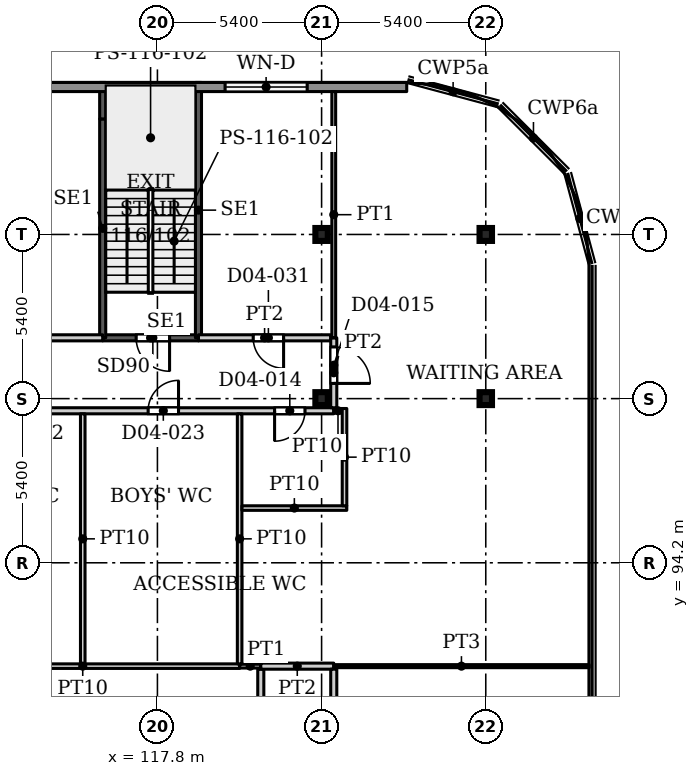
"""IFC4 building model, lengths in metres.
Left out: names, types, materials, properties, quantities, classifications, styles, units other than length and angle.
Written with IfcOpenShell. Run it as: python <this file> out.ifc"""

import sys

from ifc_helpers import new_model, si_unit, direction, frame, frame_2d, origin, origin_2d, place, context, subcontext, project, spatial, rectangle, i_section, extrude, source, transform, mapped, element, fill, save


model = new_model("IFC4")
c1 = context("Model", 3, precision=1e-05, world=origin(), true_north=direction((0.0, 1.0)))
c2 = subcontext(c1, "Body", "Model", "MODEL_VIEW")
j1 = project(units=[si_unit("LENGTHUNIT", "METRE"), si_unit("PLANEANGLEUNIT", "RADIAN")], contexts=[c1])
p1 = place(None, origin())
s1 = spatial("IfcSite", under=j1, at=p1, CompositionType="ELEMENT")
p2 = place(p1, origin())
s2 = spatial("IfcBuilding", under=s1, at=p2, CompositionType="ELEMENT")
p3 = place(p2, frame((0.0, 0.0, 21.5)))
s3 = spatial("IfcBuildingStorey", under=s2, at=p3, CompositionType="ELEMENT", Elevation=21.5)
for number, where, z_axis, x_axis in (
    (1, (123.2, 99.6, 0.0), (0.0, 0.0, 1.0), (1.0, 0.0, 0.0)),
    (2, (128.6, 99.6, 0.0), (0.0, 0.0, 1.0), (1.0, 0.0, 0.0)),
    (3, (123.2, 105.0, 0.0), (0.0, 0.0, 1.0), (1.0, 0.0, 0.0)),
    (4, (128.6, 105.0, 0.0), (0.0, 0.0, 1.0), (1.0, 0.0, 0.0)),
):
    element("IfcColumn", number, at=place(p3, frame(where, z_axis=z_axis, x_axis=x_axis)), inside=s3, PredefinedType="COLUMN", context=c2, shape_type="SweptSolid", body=[
        extrude(i_section(OverallWidth=0.409, OverallDepth=0.425, WebThickness=0.033, FlangeThickness=0.052, FilletRadius=0.013, at=origin_2d()), origin(), (0.0, 0.0, 1.0), 4.5),
    ])
p4 = place(p3, frame((78.48, 109.85, 0.0), z_axis=(0.0, 0.0, 1.0), x_axis=(1.0, 0.0, 0.0)))
e5 = element("IfcWall", 5, at=p4, inside=s3, PredefinedType="SOLIDWALL", context=c2, shape_type="SweptSolid", body=[
    extrude(rectangle(XDim=47.52, YDim=0.3, at=frame_2d((23.76, 0.0))), origin(), (0.0, 0.0, 1.0), 4.25),
])
p5 = place(p4, frame((1.045, 0.0, 0.9)))
e6 = element("IfcOpeningElement", 6, at=p5, cuts=e5, PredefinedType="OPENING", context=c2, shape_type="SweptSolid", body=[
    extrude(rectangle(XDim=2.7, YDim=2.1, at=frame_2d((1.35, 1.05))), frame((0.0, 0.16, 0.0), z_axis=(0.0, -1.0, 0.0), x_axis=(1.0, 0.0, 0.0)), (0.0, 0.0, 1.0), 0.32),
])
p6 = place(p4, frame((6.28, 0.0, 0.9)))
e7 = element("IfcOpeningElement", 7, at=p6, cuts=e5, PredefinedType="OPENING", context=c2, shape_type="SweptSolid", body=[
    extrude(rectangle(XDim=2.7, YDim=2.1, at=frame_2d((1.35, 1.05))), frame((0.0, 0.16, 0.0), z_axis=(0.0, -1.0, 0.0), x_axis=(1.0, 0.0, 0.0)), (0.0, 0.0, 1.0), 0.32),
])
p7 = place(p4, frame((15.765, 0.0, 0.9)))
e8 = element("IfcOpeningElement", 8, at=p7, cuts=e5, PredefinedType="OPENING", context=c2, shape_type="SweptSolid", body=[
    extrude(rectangle(XDim=2.7, YDim=2.1, at=frame_2d((1.35, 1.05))), frame((0.0, 0.16, 0.0), z_axis=(0.0, -1.0, 0.0), x_axis=(1.0, 0.0, 0.0)), (0.0, 0.0, 1.0), 0.32),
])
p8 = place(p4, frame((22.47, 0.0, 0.9)))
e9 = element("IfcOpeningElement", 9, at=p8, cuts=e5, PredefinedType="OPENING", context=c2, shape_type="SweptSolid", body=[
    extrude(rectangle(XDim=2.7, YDim=2.1, at=frame_2d((1.35, 1.05))), frame((0.0, 0.16, 0.0), z_axis=(0.0, -1.0, 0.0), x_axis=(1.0, 0.0, 0.0)), (0.0, 0.0, 1.0), 0.32),
])
p9 = place(p4, frame((30.99, 0.0, 0.9)))
e10 = element("IfcOpeningElement", 10, at=p9, cuts=e5, PredefinedType="OPENING", context=c2, shape_type="SweptSolid", body=[
    extrude(rectangle(XDim=2.7, YDim=2.1, at=frame_2d((1.35, 1.05))), frame((0.0, 0.16, 0.0), z_axis=(0.0, -1.0, 0.0), x_axis=(1.0, 0.0, 0.0)), (0.0, 0.0, 1.0), 0.32),
])
p10 = place(p4, frame((41.545, 0.0, 0.9)))
e11 = element("IfcOpeningElement", 11, at=p10, cuts=e5, PredefinedType="OPENING", context=c2, shape_type="SweptSolid", body=[
    extrude(rectangle(XDim=2.7, YDim=2.1, at=frame_2d((1.35, 1.05))), frame((0.0, 0.16, 0.0), z_axis=(0.0, -1.0, 0.0), x_axis=(1.0, 0.0, 0.0)), (0.0, 0.0, 1.0), 0.32),
])
p11 = place(p3, frame((116.0, 101.6, 0.0), z_axis=(0.0, 0.0, 1.0), x_axis=(1.0, 0.0, 0.0)))
e12 = element("IfcWall", 12, at=p11, inside=s3, PredefinedType="SHEAR", context=c2, shape_type="SweptSolid", body=[
    extrude(rectangle(XDim=3.15, YDim=0.2, at=frame_2d((1.575, 0.0))), origin(), (0.0, 0.0, 1.0), 4.5),
])
p12 = place(p11, frame((1.1, 0.0, 0.0)))
e13 = element("IfcOpeningElement", 13, at=p12, cuts=e12, PredefinedType="OPENING", context=c2, shape_type="SweptSolid", body=[
    extrude(rectangle(XDim=1.1, YDim=2.2, at=frame_2d((0.55, 1.1))), frame((0.0, 0.11, 0.0), z_axis=(0.0, -1.0, 0.0), x_axis=(1.0, 0.0, 0.0)), (0.0, 0.0, 1.0), 0.22),
])
p13 = place(p3, frame((116.0, 101.6, 0.0), z_axis=(0.0, 0.0, 1.0), x_axis=(0.0, 1.0, 0.0)))
e14 = element("IfcWall", 14, at=p13, inside=s3, PredefinedType="SHEAR", context=c2, shape_type="SweptSolid", body=[
    extrude(rectangle(XDim=7.2, YDim=0.2, at=frame_2d((3.6, 0.0))), origin(), (0.0, 0.0, 1.0), 4.5),
])
p14 = place(p3, frame((116.0, 108.8, 0.0), z_axis=(0.0, 0.0, 1.0), x_axis=(0.0, 1.0, 0.0)))
e15 = element("IfcWall", 15, at=p14, inside=s3, PredefinedType="SHEAR", context=c2, shape_type="SweptSolid", body=[
    extrude(rectangle(XDim=1.2, YDim=0.2, at=frame_2d((0.6, 0.0))), origin(), (0.0, 0.0, 1.0), 4.5),
])
p15 = place(p3, frame((119.15, 101.6, 0.0), z_axis=(0.0, 0.0, 1.0), x_axis=(0.0, 1.0, 0.0)))
e16 = element("IfcWall", 16, at=p15, inside=s3, PredefinedType="SHEAR", context=c2, shape_type="SweptSolid", body=[
    extrude(rectangle(XDim=8.4, YDim=0.2, at=frame_2d((4.2, 0.0))), origin(), (0.0, 0.0, 1.0), 4.5),
])
p16 = place(p3, frame((56.1, 99.2, 0.0), z_axis=(0.0, 0.0, 1.0), x_axis=(1.0, 0.0, 0.0)))
e17 = element("IfcWall", 17, at=p16, inside=s3, PredefinedType="PARTITIONING", context=c2, shape_type="SweptSolid", body=[
    extrude(rectangle(XDim=67.5, YDim=0.2, at=frame_2d((33.75, 0.0))), origin(), (0.0, 0.0, 1.0), 4.18),
])
p17 = place(p16, frame((4.05, 0.0, 0.0)))
e18 = element("IfcOpeningElement", 18, at=p17, cuts=e17, PredefinedType="OPENING", context=c2, shape_type="SweptSolid", body=[
    extrude(rectangle(XDim=1.0, YDim=2.1, at=frame_2d((0.5, 1.05))), frame((0.0, 0.11, 0.0), z_axis=(0.0, -1.0, 0.0), x_axis=(1.0, 0.0, 0.0)), (0.0, 0.0, 1.0), 0.22),
])
p18 = place(p16, frame((65.554, 0.0, 0.0)))
e19 = element("IfcOpeningElement", 19, at=p18, cuts=e17, PredefinedType="OPENING", context=c2, shape_type="SweptSolid", body=[
    extrude(rectangle(XDim=1.0, YDim=2.1, at=frame_2d((0.5, 1.05))), frame((0.0, 0.11, 0.0), z_axis=(0.0, -1.0, 0.0), x_axis=(1.0, 0.0, 0.0)), (0.0, 0.0, 1.0), 0.22),
])
p19 = place(p16, frame((11.589, 0.0, 0.0)))
e20 = element("IfcOpeningElement", 20, at=p19, cuts=e17, PredefinedType="OPENING", context=c2, shape_type="SweptSolid", body=[
    extrude(rectangle(XDim=1.0, YDim=2.1, at=frame_2d((0.5, 1.05))), frame((0.0, 0.11, 0.0), z_axis=(0.0, -1.0, 0.0), x_axis=(1.0, 0.0, 0.0)), (0.0, 0.0, 1.0), 0.22),
])
p20 = place(p16, frame((20.329, 0.0, 0.0)))
e21 = element("IfcOpeningElement", 21, at=p20, cuts=e17, PredefinedType="OPENING", context=c2, shape_type="SweptSolid", body=[
    extrude(rectangle(XDim=1.0, YDim=2.1, at=frame_2d((0.5, 1.05))), frame((0.0, 0.11, 0.0), z_axis=(0.0, -1.0, 0.0), x_axis=(1.0, 0.0, 0.0)), (0.0, 0.0, 1.0), 0.22),
])
p21 = place(p16, frame((27.319, 0.0, 0.0)))
e22 = element("IfcOpeningElement", 22, at=p21, cuts=e17, PredefinedType="OPENING", context=c2, shape_type="SweptSolid", body=[
    extrude(rectangle(XDim=1.0, YDim=2.1, at=frame_2d((0.5, 1.05))), frame((0.0, 0.11, 0.0), z_axis=(0.0, -1.0, 0.0), x_axis=(1.0, 0.0, 0.0)), (0.0, 0.0, 1.0), 0.22),
])
p22 = place(p16, frame((33.262, 0.0, 0.0)))
e23 = element("IfcOpeningElement", 23, at=p22, cuts=e17, PredefinedType="OPENING", context=c2, shape_type="SweptSolid", body=[
    extrude(rectangle(XDim=1.0, YDim=2.1, at=frame_2d((0.5, 1.05))), frame((0.0, 0.11, 0.0), z_axis=(0.0, -1.0, 0.0), x_axis=(1.0, 0.0, 0.0)), (0.0, 0.0, 1.0), 0.22),
])
p23 = place(p16, frame((42.002, 0.0, 0.0)))
e24 = element("IfcOpeningElement", 24, at=p23, cuts=e17, PredefinedType="OPENING", context=c2, shape_type="SweptSolid", body=[
    extrude(rectangle(XDim=1.0, YDim=2.1, at=frame_2d((0.5, 1.05))), frame((0.0, 0.11, 0.0), z_axis=(0.0, -1.0, 0.0), x_axis=(1.0, 0.0, 0.0)), (0.0, 0.0, 1.0), 0.22),
])
p24 = place(p16, frame((49.743, 0.0, 0.0)))
e25 = element("IfcOpeningElement", 25, at=p24, cuts=e17, PredefinedType="OPENING", context=c2, shape_type="SweptSolid", body=[
    extrude(rectangle(XDim=1.0, YDim=2.1, at=frame_2d((0.5, 1.05))), frame((0.0, 0.11, 0.0), z_axis=(0.0, -1.0, 0.0), x_axis=(1.0, 0.0, 0.0)), (0.0, 0.0, 1.0), 0.22),
])
p25 = place(p16, frame((56.733, 0.0, 0.0)))
e26 = element("IfcOpeningElement", 26, at=p25, cuts=e17, PredefinedType="OPENING", context=c2, shape_type="SweptSolid", body=[
    extrude(rectangle(XDim=1.0, YDim=2.1, at=frame_2d((0.5, 1.05))), frame((0.0, 0.11, 0.0), z_axis=(0.0, -1.0, 0.0), x_axis=(1.0, 0.0, 0.0)), (0.0, 0.0, 1.0), 0.22),
])
p26 = place(p16, frame((61.394, 0.0, 0.0)))
e27 = element("IfcOpeningElement", 27, at=p26, cuts=e17, PredefinedType="OPENING", context=c2, shape_type="SweptSolid", body=[
    extrude(rectangle(XDim=1.0, YDim=2.1, at=frame_2d((0.5, 1.05))), frame((0.0, 0.11, 0.0), z_axis=(0.0, -1.0, 0.0), x_axis=(1.0, 0.0, 0.0)), (0.0, 0.0, 1.0), 0.22),
])
p27 = place(p3, frame((93.15, 101.6, 0.0), z_axis=(0.0, 0.0, 1.0), x_axis=(1.0, 0.0, 0.0)))
e28 = element("IfcWall", 28, at=p27, inside=s3, PredefinedType="PARTITIONING", context=c2, shape_type="SweptSolid", body=[
    extrude(rectangle(XDim=22.85, YDim=0.2, at=frame_2d((11.425, 0.0))), origin(), (0.0, 0.0, 1.0), 4.18),
])
p28 = place(p27, frame((1.987, 0.0, 0.0)))
e29 = element("IfcOpeningElement", 29, at=p28, cuts=e28, PredefinedType="OPENING", context=c2, shape_type="SweptSolid", body=[
    extrude(rectangle(XDim=1.0, YDim=2.1, at=frame_2d((0.5, 1.05))), frame((0.0, 0.11, 0.0), z_axis=(0.0, -1.0, 0.0), x_axis=(1.0, 0.0, 0.0)), (0.0, 0.0, 1.0), 0.22),
])
p29 = place(p27, frame((8.758, 0.0, 0.0)))
e30 = element("IfcOpeningElement", 30, at=p29, cuts=e28, PredefinedType="OPENING", context=c2, shape_type="SweptSolid", body=[
    extrude(rectangle(XDim=1.0, YDim=2.1, at=frame_2d((0.5, 1.05))), frame((0.0, 0.11, 0.0), z_axis=(0.0, -1.0, 0.0), x_axis=(1.0, 0.0, 0.0)), (0.0, 0.0, 1.0), 0.22),
])
p30 = place(p27, frame((17.279, 0.0, 0.0)))
e31 = element("IfcOpeningElement", 31, at=p30, cuts=e28, PredefinedType="OPENING", context=c2, shape_type="SweptSolid", body=[
    extrude(rectangle(XDim=1.0, YDim=2.1, at=frame_2d((0.5, 1.05))), frame((0.0, 0.11, 0.0), z_axis=(0.0, -1.0, 0.0), x_axis=(1.0, 0.0, 0.0)), (0.0, 0.0, 1.0), 0.22),
])
p31 = place(p3, frame((110.183, 90.8, 0.0), z_axis=(0.0, 0.0, 1.0), x_axis=(1.0, 0.0, 0.0)))
e32 = element("IfcWall", 32, at=p31, inside=s3, PredefinedType="PARTITIONING", context=c2, shape_type="SweptSolid", body=[
    extrude(rectangle(XDim=10.321, YDim=0.15, at=frame_2d((5.16, 0.0))), origin(), (0.0, 0.0, 1.0), 4.18),
])
p32 = place(p3, frame((115.344, 90.875, 0.0), z_axis=(0.0, 0.0, 1.0), x_axis=(0.0, 1.0, 0.0)))
e33 = element("IfcWall", 33, at=p32, inside=s3, PredefinedType="PARTITIONING", context=c2, shape_type="SweptSolid", body=[
    extrude(rectangle(XDim=8.225, YDim=0.15, at=frame_2d((4.113, 0.0))), origin(), (0.0, 0.0, 1.0), 4.18),
])
p33 = place(p3, frame((119.15, 101.6, 0.0), z_axis=(0.0, 0.0, 1.0), x_axis=(1.0, 0.0, 0.0)))
e34 = element("IfcWall", 34, at=p33, inside=s3, PredefinedType="PARTITIONING", context=c2, shape_type="SweptSolid", body=[
    extrude(rectangle(XDim=4.35, YDim=0.2, at=frame_2d((2.175, 0.0))), origin(), (0.0, 0.0, 1.0), 4.18),
])
p34 = place(p33, frame((1.8, 0.0, 0.0)))
e35 = element("IfcOpeningElement", 35, at=p34, cuts=e34, PredefinedType="OPENING", context=c2, shape_type="SweptSolid", body=[
    extrude(rectangle(XDim=1.0, YDim=2.1, at=frame_2d((0.5, 1.05))), frame((0.0, 0.11, 0.0), z_axis=(0.0, -1.0, 0.0), x_axis=(1.0, 0.0, 0.0)), (0.0, 0.0, 1.0), 0.22),
])
p35 = place(p3, frame((120.504, 90.8, 0.0), z_axis=(0.0, 0.0, 1.0), x_axis=(1.0, 0.0, 0.0)))
e36 = element("IfcWall", 36, at=p35, inside=s3, PredefinedType="PARTITIONING", context=c2, shape_type="SweptSolid", body=[
    extrude(rectangle(XDim=0.696, YDim=0.125, at=frame_2d((0.348, 0.0))), origin(), (0.0, 0.0, 1.0), 4.18),
])
p36 = place(p3, frame((120.504, 90.875, 0.0), z_axis=(0.0, 0.0, 1.0), x_axis=(0.0, 1.0, 0.0)))
e37 = element("IfcWall", 37, at=p36, inside=s3, PredefinedType="PARTITIONING", context=c2, shape_type="SweptSolid", body=[
    extrude(rectangle(XDim=8.225, YDim=0.15, at=frame_2d((4.113, 0.0))), origin(), (0.0, 0.0, 1.0), 4.18),
])
p37 = place(p3, frame((120.579, 96.0, 0.0), z_axis=(0.0, 0.0, 1.0), x_axis=(1.0, 0.0, 0.0)))
e38 = element("IfcWall", 38, at=p37, inside=s3, PredefinedType="PARTITIONING", context=c2, shape_type="SweptSolid", body=[
    extrude(rectangle(XDim=3.45, YDim=0.15, at=frame_2d((1.725, 0.0))), origin(), (0.0, 0.0, 1.0), 4.18),
])
p38 = place(p3, frame((121.2, 74.6, 0.0), z_axis=(0.0, 0.0, 1.0), x_axis=(0.0, 1.0, 0.0)))
e39 = element("IfcWall", 39, at=p38, inside=s3, PredefinedType="PARTITIONING", context=c2, shape_type="SweptSolid", body=[
    extrude(rectangle(XDim=16.1, YDim=0.2, at=frame_2d((8.05, 0.0))), origin(), (0.0, 0.0, 1.0), 4.18),
])
p39 = place(p38, frame((3.987, 0.0, 0.0)))
e40 = element("IfcOpeningElement", 40, at=p39, cuts=e39, PredefinedType="OPENING", context=c2, shape_type="SweptSolid", body=[
    extrude(rectangle(XDim=1.0, YDim=2.1, at=frame_2d((0.5, 1.05))), frame((0.0, 0.11, 0.0), z_axis=(0.0, -1.0, 0.0), x_axis=(1.0, 0.0, 0.0)), (0.0, 0.0, 1.0), 0.22),
])
p40 = place(p38, frame((12.05, 0.0, 0.0)))
e41 = element("IfcOpeningElement", 41, at=p40, cuts=e39, PredefinedType="OPENING", context=c2, shape_type="SweptSolid", body=[
    extrude(rectangle(XDim=1.0, YDim=2.1, at=frame_2d((0.5, 1.05))), frame((0.0, 0.11, 0.0), z_axis=(0.0, -1.0, 0.0), x_axis=(1.0, 0.0, 0.0)), (0.0, 0.0, 1.0), 0.22),
])
p41 = place(p3, frame((121.2, 90.8, 0.0), z_axis=(0.0, 0.0, 1.0), x_axis=(1.0, 0.0, 0.0)))
e42 = element("IfcWall", 42, at=p41, inside=s3, PredefinedType="PARTITIONING", context=c2, shape_type="SweptSolid", body=[
    extrude(rectangle(XDim=2.4, YDim=0.2, at=frame_2d((1.2, 0.0))), origin(), (0.0, 0.0, 1.0), 4.18),
])
p42 = place(p3, frame((123.6, 69.15, 0.0), z_axis=(0.0, 0.0, 1.0), x_axis=(0.0, 1.0, 0.0)))
e43 = element("IfcWall", 43, at=p42, inside=s3, PredefinedType="PARTITIONING", context=c2, shape_type="SweptSolid", body=[
    extrude(rectangle(XDim=21.55, YDim=0.2, at=frame_2d((10.775, 0.0))), origin(), (0.0, 0.0, 1.0), 4.18),
])
p43 = place(p42, frame((4.4, 0.0, 0.0)))
e44 = element("IfcOpeningElement", 44, at=p43, cuts=e43, PredefinedType="OPENING", context=c2, shape_type="SweptSolid", body=[
    extrude(rectangle(XDim=1.0, YDim=2.1, at=frame_2d((0.5, 1.05))), frame((0.0, 0.11, 0.0), z_axis=(0.0, -1.0, 0.0), x_axis=(1.0, 0.0, 0.0)), (0.0, 0.0, 1.0), 0.22),
])
p44 = place(p42, frame((15.238, 0.0, 0.0)))
e45 = element("IfcOpeningElement", 45, at=p44, cuts=e43, PredefinedType="OPENING", context=c2, shape_type="SweptSolid", body=[
    extrude(rectangle(XDim=1.0, YDim=2.1, at=frame_2d((0.5, 1.05))), frame((0.0, 0.11, 0.0), z_axis=(0.0, -1.0, 0.0), x_axis=(1.0, 0.0, 0.0)), (0.0, 0.0, 1.0), 0.22),
])
p45 = place(p42, frame((11.238, 0.0, 0.0)))
e46 = element("IfcOpeningElement", 46, at=p45, cuts=e43, PredefinedType="OPENING", context=c2, shape_type="SweptSolid", body=[
    extrude(rectangle(XDim=1.2, YDim=2.1, at=frame_2d((0.6, 1.05))), frame((0.0, 0.11, 0.0), z_axis=(0.0, -1.0, 0.0), x_axis=(1.0, 0.0, 0.0)), (0.0, 0.0, 1.0), 0.22),
])
p46 = place(p3, frame((123.6, 90.8, 0.0), z_axis=(0.0, 0.0, 1.0), x_axis=(1.0, 0.0, 0.0)))
e47 = element("IfcWall", 47, at=p46, inside=s3, PredefinedType="PARTITIONING", context=c2, shape_type="SweptSolid", body=[
    extrude(rectangle(XDim=8.4, YDim=0.1, at=frame_2d((4.2, 0.0))), origin(), (0.0, 0.0, 1.0), 4.18),
])
p47 = place(p3, frame((123.6, 99.2, 0.0), z_axis=(0.0, 0.0, 1.0), x_axis=(1.0, 0.0, 0.0)))
e48 = element("IfcWall", 48, at=p47, inside=s3, PredefinedType="PARTITIONING", context=c2, shape_type="SweptSolid", body=[
    extrude(rectangle(XDim=0.279, YDim=0.15, at=frame_2d((0.139, 0.0))), origin(), (0.0, 0.0, 1.0), 4.18),
])
p48 = place(p3, frame((123.6, 99.3, 0.0), z_axis=(0.0, 0.0, 1.0), x_axis=(0.0, 1.0, 0.0)))
e49 = element("IfcWall", 49, at=p48, inside=s3, PredefinedType="PARTITIONING", context=c2, shape_type="SweptSolid", body=[
    extrude(rectangle(XDim=2.3, YDim=0.2, at=frame_2d((1.15, 0.0))), origin(), (0.0, 0.0, 1.0), 4.18),
])
p49 = place(p48, frame((0.8, 0.0, 0.0)))
e50 = element("IfcOpeningElement", 50, at=p49, cuts=e49, PredefinedType="OPENING", context=c2, shape_type="SweptSolid", body=[
    extrude(rectangle(XDim=1.2, YDim=2.1, at=frame_2d((0.6, 1.05))), frame((0.0, 0.11, 0.0), z_axis=(0.0, -1.0, 0.0), x_axis=(1.0, 0.0, 0.0)), (0.0, 0.0, 1.0), 0.22),
])
p50 = place(p3, frame((123.6, 101.6, 0.0), z_axis=(0.0, 0.0, 1.0), x_axis=(0.0, 1.0, 0.0)))
e51 = element("IfcWall", 51, at=p50, inside=s3, PredefinedType="PARTITIONING", context=c2, shape_type="SweptSolid", body=[
    extrude(rectangle(XDim=8.101, YDim=0.125, at=frame_2d((4.05, 0.0))), origin(), (0.0, 0.0, 1.0), 4.18),
])
p51 = place(p3, frame((123.954, 96.075, 0.0), z_axis=(0.0, 0.0, 1.0), x_axis=(0.0, 1.0, 0.0)))
e52 = element("IfcWall", 52, at=p51, inside=s3, PredefinedType="PARTITIONING", context=c2, shape_type="SweptSolid", body=[
    extrude(rectangle(XDim=3.2, YDim=0.15, at=frame_2d((1.6, 0.0))), origin(), (0.0, 0.0, 1.0), 4.18),
])
m1 = source(origin(), c2, "Body", "SweptSolid", [
    extrude(rectangle(XDim=2.7, YDim=2.1, at=frame_2d((1.35, 1.05))), frame((0.0, 0.03, 0.0), z_axis=(0.0, -1.0, 0.0), x_axis=(1.0, 0.0, 0.0)), (0.0, 0.0, 1.0), 0.06),
])
p52 = place(p10, origin())
e53 = element("IfcWindow", 53, at=p52, inside=s3, PartitioningType="SINGLE_PANEL", PredefinedType="WINDOW", context=c2, shape_type="MappedRepresentation", body=[
    mapped(m1, transform((0.0, 0.0, 0.0), x_axis=(1.0, 0.0, 0.0), y_axis=(0.0, 1.0, 0.0), z_axis=(0.0, 0.0, 1.0), scale=1.0)),
])
fill(e11, e53)
m2 = source(origin(), c2, "Body", "SweptSolid", [
    extrude(rectangle(XDim=1.1, YDim=2.2, at=frame_2d((0.55, 1.1))), frame((0.0, 0.025, 0.0), z_axis=(0.0, -1.0, 0.0), x_axis=(1.0, 0.0, 0.0)), (0.0, 0.0, 1.0), 0.05),
])
p53 = place(p12, origin())
e54 = element("IfcDoor", 54, at=p53, inside=s3, OperationType="SINGLE_SWING_RIGHT", PredefinedType="DOOR", context=c2, shape_type="MappedRepresentation", body=[
    mapped(m2, transform((0.0, 0.0, 0.0), x_axis=(1.0, 0.0, 0.0), y_axis=(0.0, 1.0, 0.0), z_axis=(0.0, 0.0, 1.0), scale=1.0)),
])
fill(e13, e54)
m3 = source(origin(), c2, "Body", "SweptSolid", [
    extrude(rectangle(XDim=1.0, YDim=2.1, at=frame_2d((0.5, 1.05))), frame((0.0, 0.025, 0.0), z_axis=(0.0, -1.0, 0.0), x_axis=(1.0, 0.0, 0.0)), (0.0, 0.0, 1.0), 0.05),
])
p54 = place(p18, origin())
e55 = element("IfcDoor", 55, at=p54, inside=s3, OperationType="SINGLE_SWING_RIGHT", PredefinedType="DOOR", context=c2, shape_type="MappedRepresentation", body=[
    mapped(m3, transform((0.0, 0.0, 0.0), x_axis=(1.0, 0.0, 0.0), y_axis=(0.0, 1.0, 0.0), z_axis=(0.0, 0.0, 1.0), scale=1.0)),
])
fill(e19, e55)
m4 = source(origin(), c2, "Body", "SweptSolid", [
    extrude(rectangle(XDim=1.2, YDim=2.1, at=frame_2d((0.6, 1.05))), frame((0.0, 0.025, 0.0), z_axis=(0.0, -1.0, 0.0), x_axis=(1.0, 0.0, 0.0)), (0.0, 0.0, 1.0), 0.05),
])
p55 = place(p49, origin())
e56 = element("IfcDoor", 56, at=p55, inside=s3, OperationType="SINGLE_SWING_RIGHT", PredefinedType="DOOR", context=c2, shape_type="MappedRepresentation", body=[
    mapped(m4, transform((0.0, 0.0, 0.0), x_axis=(1.0, 0.0, 0.0), y_axis=(0.0, 1.0, 0.0), z_axis=(0.0, 0.0, 1.0), scale=1.0)),
])
fill(e50, e56)
p56 = place(p26, origin())
e57 = element("IfcDoor", 57, at=p56, inside=s3, OperationType="SINGLE_SWING_LEFT", PredefinedType="DOOR", context=c2, shape_type="MappedRepresentation", body=[
    mapped(m3, transform((0.0, 0.0, 0.0), x_axis=(1.0, 0.0, 0.0), y_axis=(0.0, 1.0, 0.0), z_axis=(0.0, 0.0, 1.0), scale=1.0)),
])
fill(e27, e57)
p57 = place(p34, origin())
e58 = element("IfcDoor", 58, at=p57, inside=s3, OperationType="SINGLE_SWING_RIGHT", PredefinedType="DOOR", context=c2, shape_type="MappedRepresentation", body=[
    mapped(m3, transform((0.0, 0.0, 0.0), x_axis=(1.0, 0.0, 0.0), y_axis=(0.0, 1.0, 0.0), z_axis=(0.0, 0.0, 1.0), scale=1.0)),
])
fill(e35, e58)
save(model, sys.argv[1])
